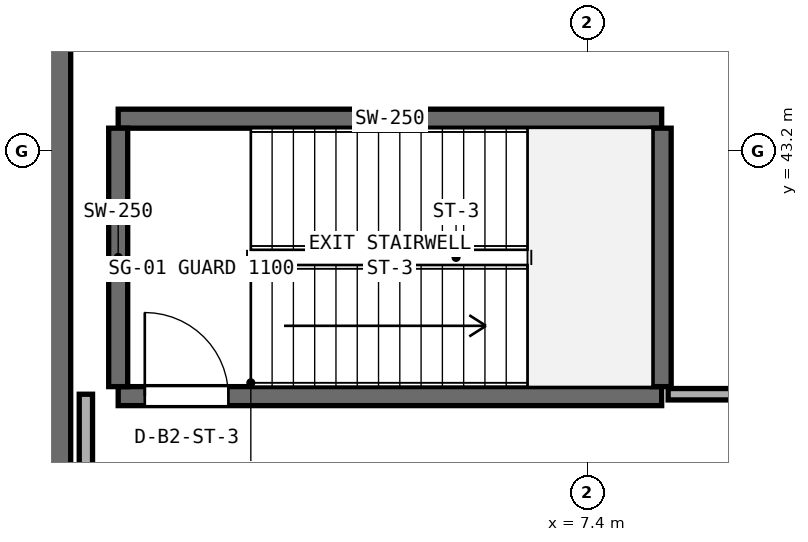
"""IFC4 building model, lengths in metres.
Left out: names, types, materials, properties, quantities, classifications, styles, units other than length and angle.
Written with IfcOpenShell. Run it as: python <this file> out.ifc"""

import sys

from ifc_helpers import new_model, si_unit, direction, frame, frame_2d, origin, place, context, subcontext, project, spatial, rectangle, extrude, element, fill, save


model = new_model("IFC4")
c1 = context("Model", 3, precision=1e-05, world=origin(), true_north=direction((0.0, 1.0)))
c2 = subcontext(c1, "Body", "Model", "MODEL_VIEW")
j1 = project(units=[si_unit("LENGTHUNIT", "METRE"), si_unit("PLANEANGLEUNIT", "RADIAN")], contexts=[c1])
p1 = place(None, origin())
s1 = spatial("IfcSite", under=j1, at=p1, CompositionType="ELEMENT")
p2 = place(p1, origin())
s2 = spatial("IfcBuilding", under=s1, at=p2, CompositionType="ELEMENT")
p3 = place(p2, frame((0.0, 0.0, -9.6)))
s3 = spatial("IfcBuildingStorey", under=s2, at=p3, CompositionType="ELEMENT", Elevation=-9.6)
p4 = place(p3, frame((0.3, 0.6, 0.0), z_axis=(0.0, 0.0, 1.0), x_axis=(0.0, 1.0, 0.0)))
e1 = element("IfcWall", 1, at=p4, inside=s3, PredefinedType="SOLIDWALL", context=c2, shape_type="SweptSolid", body=[
    extrude(rectangle(XDim=49.2, YDim=0.6, at=frame_2d((24.6, 0.0))), origin(), (0.0, 0.0, 1.0), 4.45),
])
p5 = place(p3, frame((1.225, 39.975, 0.0), z_axis=(0.0, 0.0, 1.0), x_axis=(1.0, 0.0, 0.0)))
e2 = element("IfcWall", 2, at=p5, inside=s3, PredefinedType="SHEAR", context=c2, shape_type="SweptSolid", body=[
    extrude(rectangle(XDim=7.15, YDim=0.25, at=frame_2d((3.575, 0.0))), origin(), (0.0, 0.0, 1.0), 4.45),
])
p6 = place(p5, frame((0.35, 0.0, 0.0)))
e3 = element("IfcOpeningElement", 3, at=p6, cuts=e2, PredefinedType="OPENING", context=c2, shape_type="SweptSolid", body=[
    extrude(rectangle(XDim=1.1, YDim=2.15, at=frame_2d((0.55, 1.075))), frame((0.0, 0.135, 0.0), z_axis=(0.0, -1.0, 0.0), x_axis=(1.0, 0.0, 0.0)), (0.0, 0.0, 1.0), 0.27),
])
p7 = place(p3, frame((1.225, 43.625, 0.0), z_axis=(0.0, 0.0, 1.0), x_axis=(1.0, 0.0, 0.0)))
e4 = element("IfcWall", 4, at=p7, inside=s3, PredefinedType="SHEAR", context=c2, shape_type="SweptSolid", body=[
    extrude(rectangle(XDim=7.15, YDim=0.25, at=frame_2d((3.575, 0.0))), origin(), (0.0, 0.0, 1.0), 4.45),
])
for number, where, z_axis, x_axis in (
    (5, (1.225, 40.1, 0.0), (0.0, 0.0, 1.0), (0.0, 1.0, 0.0)),
    (6, (8.375, 40.1, 0.0), (0.0, 0.0, 1.0), (0.0, 1.0, 0.0)),
):
    element("IfcWall", number, at=place(p3, frame(where, z_axis=z_axis, x_axis=x_axis)), inside=s3, PredefinedType="SHEAR", context=c2, shape_type="SweptSolid", body=[
        extrude(rectangle(XDim=3.4, YDim=0.25, at=frame_2d((1.7, 0.0))), origin(), (0.0, 0.0, 1.0), 4.45),
    ])
p8 = place(p3, frame((0.8, 37.5, 0.0), z_axis=(0.0, 0.0, 1.0), x_axis=(0.0, 1.0, 0.0)))
e7 = element("IfcWall", 7, at=p8, inside=s3, PredefinedType="PARTITIONING", context=c2, shape_type="SweptSolid", body=[
    extrude(rectangle(XDim=2.5, YDim=0.175, at=frame_2d((1.25, 0.0))), origin(), (0.0, 0.0, 1.0), 4.45),
])
p9 = place(p3, frame((8.46, 40.0, 0.0), z_axis=(0.0, 0.0, 1.0), x_axis=(1.0, 0.0, 0.0)))
e8 = element("IfcWall", 8, at=p9, inside=s3, PredefinedType="PARTITIONING", context=c2, shape_type="SweptSolid", body=[
    extrude(rectangle(XDim=57.68, YDim=0.15, at=frame_2d((28.84, 0.0))), origin(), (0.0, 0.0, 1.0), 4.45),
])
p10 = place(p9, frame((28.09, 0.0, 0.0)))
e9 = element("IfcOpeningElement", 9, at=p10, cuts=e8, PredefinedType="OPENING", context=c2, shape_type="SweptSolid", body=[
    extrude(rectangle(XDim=1.5, YDim=2.15, at=frame_2d((0.75, 1.075))), frame((0.0, 0.085, 0.0), z_axis=(0.0, -1.0, 0.0), x_axis=(1.0, 0.0, 0.0)), (0.0, 0.0, 1.0), 0.17),
])
p11 = place(p6, origin())
e10 = element("IfcDoor", 10, at=p11, inside=s3, OperationType="SINGLE_SWING_LEFT", PredefinedType="DOOR", context=c2, shape_type="SweptSolid", body=[
    extrude(rectangle(XDim=1.1, YDim=2.15, at=frame_2d((0.55, 1.075))), frame((0.0, 0.025, 0.0), z_axis=(0.0, -1.0, 0.0), x_axis=(1.0, 0.0, 0.0)), (0.0, 0.0, 1.0), 0.05),
])
fill(e3, e10)
save(model, sys.argv[1])
